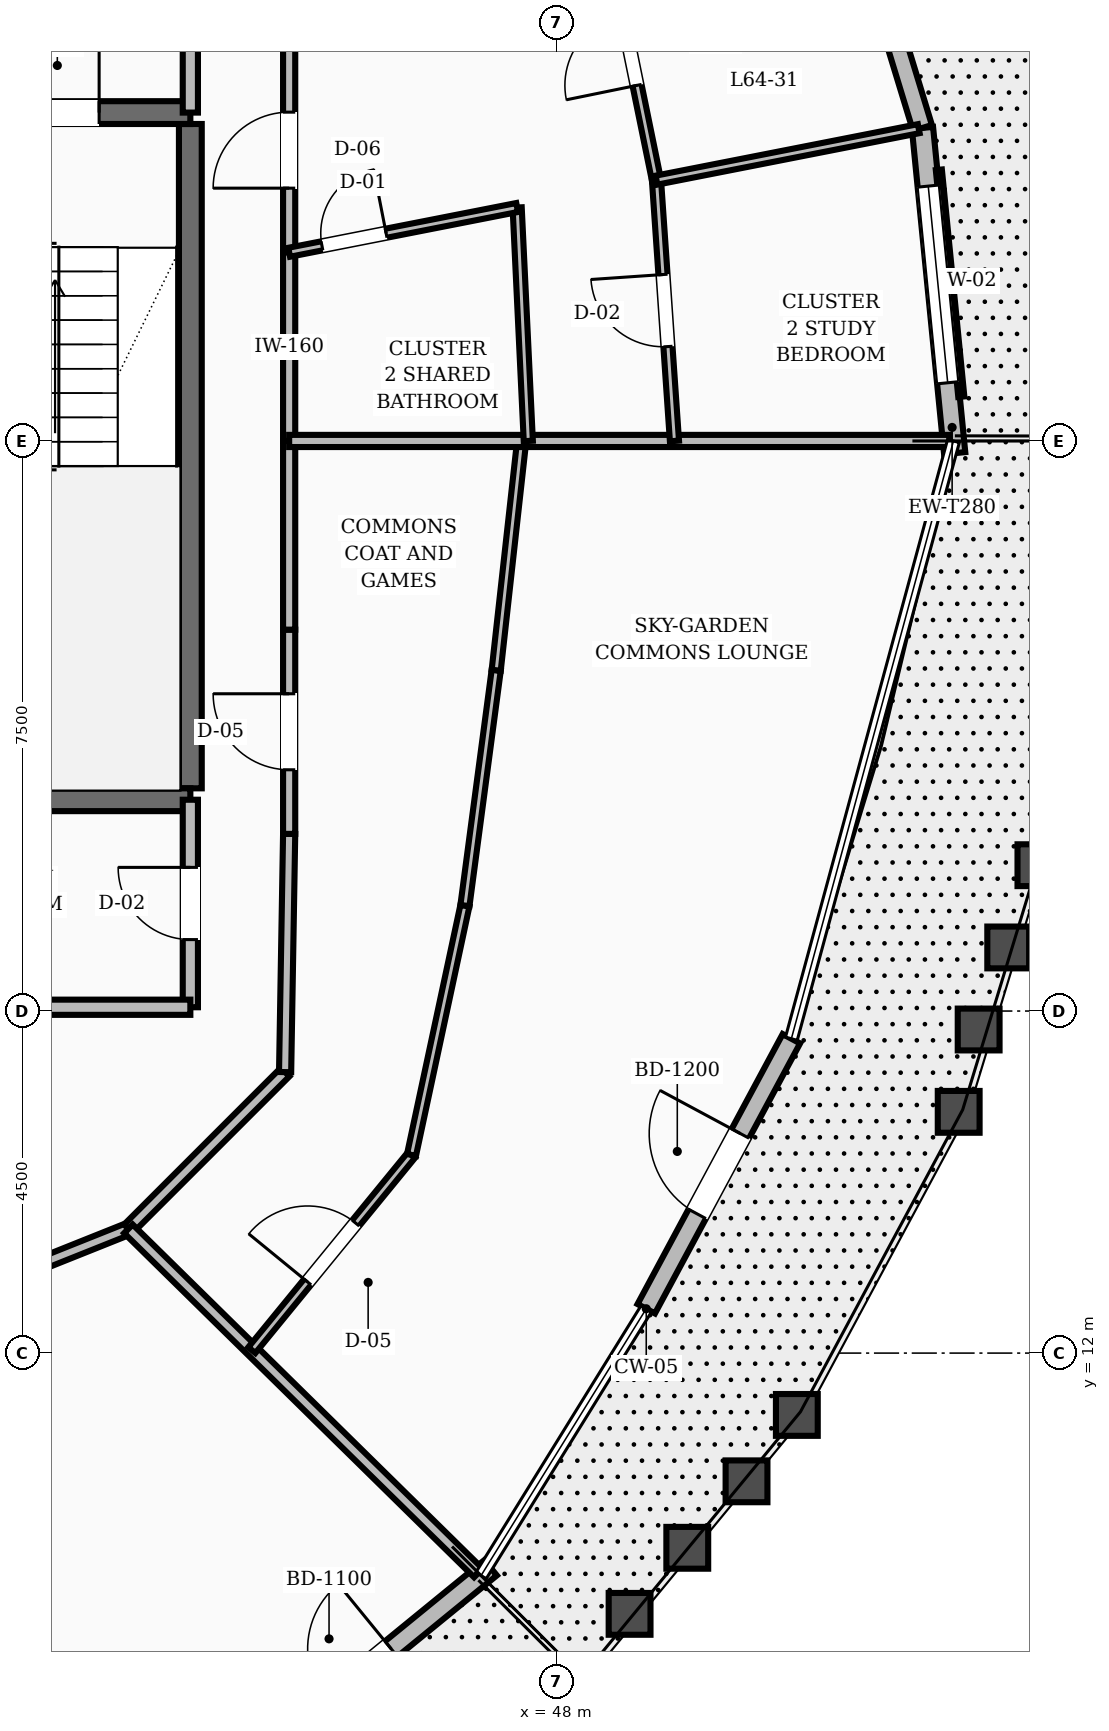
"""IFC4 building model, lengths in metres.
Left out: names, types, materials, properties, quantities, classifications, styles, units other than length and angle.
Written with IfcOpenShell. Run it as: python <this file> out.ifc"""

import sys

from ifc_helpers import new_model, si_unit, direction, frame, frame_2d, origin, place, context, subcontext, project, spatial, rectangle, extrude, element, fill, save


model = new_model("IFC4")
c1 = context("Model", 3, precision=1e-05, world=origin(), true_north=direction((0.0, 1.0)))
c2 = subcontext(c1, "Body", "Model", "MODEL_VIEW")
j1 = project(units=[si_unit("LENGTHUNIT", "METRE"), si_unit("PLANEANGLEUNIT", "RADIAN")], contexts=[c1])
p1 = place(None, origin())
s1 = spatial("IfcSite", under=j1, at=p1, CompositionType="ELEMENT")
p2 = place(p1, origin())
s2 = spatial("IfcBuilding", under=s1, at=p2, CompositionType="ELEMENT")
p3 = place(p2, frame((0.0, 0.0, 247.2)))
s3 = spatial("IfcBuildingStorey", under=s2, at=p3, CompositionType="ELEMENT", Elevation=247.2)
p4 = place(p3, frame((43.18, 19.43, 0.0), z_axis=(0.0, 0.0, 1.0), x_axis=(0.0, 1.0, 0.0)))
e1 = element("IfcWall", 1, at=p4, inside=s3, PredefinedType="SHEAR", context=c2, shape_type="SweptSolid", body=[
    extrude(rectangle(XDim=8.74, YDim=0.3, at=frame_2d((4.37, 0.0))), origin(), (0.0, 0.0, 1.0), 3.6),
])
p5 = place(p3, frame((39.58, 19.28, 0.0), z_axis=(0.0, 0.0, 1.0), x_axis=(1.0, 0.0, 0.0)))
e2 = element("IfcWall", 2, at=p5, inside=s3, PredefinedType="SHEAR", context=c2, shape_type="SweptSolid", body=[
    extrude(rectangle(XDim=3.6, YDim=0.3, at=frame_2d((1.8, 0.0))), origin(), (0.0, 0.0, 1.0), 3.6),
])
p6 = place(p3, frame((39.58, 28.32, 0.0), z_axis=(0.0, 0.0, 1.0), x_axis=(1.0, 0.0, 0.0)))
e3 = element("IfcWall", 3, at=p6, inside=s3, PredefinedType="SHEAR", context=c2, shape_type="SweptSolid", body=[
    extrude(rectangle(XDim=3.6, YDim=0.3, at=frame_2d((1.8, 0.0))), origin(), (0.0, 0.0, 1.0), 3.6),
])
p7 = place(p6, frame((1.3, 0.0, 0.0)))
e4 = element("IfcOpeningElement", 4, at=p7, cuts=e3, PredefinedType="OPENING", context=c2, shape_type="SweptSolid", body=[
    extrude(rectangle(XDim=1.1, YDim=2.1, at=frame_2d((0.55, 1.05))), frame((0.0, 0.16, 0.0), z_axis=(0.0, -1.0, 0.0), x_axis=(1.0, 0.0, 0.0)), (0.0, 0.0, 1.0), 0.32),
])
p8 = place(p3, frame((53.236, 23.84, 0.0), z_axis=(0.0, 0.0, 1.0), x_axis=(-0.098514226855, 0.995135642567, 0.0)))
e5 = element("IfcWall", 5, at=p8, inside=s3, PredefinedType="STANDARD", context=c2, shape_type="SweptSolid", body=[
    extrude(rectangle(XDim=4.3, YDim=0.28, at=frame_2d((2.15, 0.0))), origin(), (0.0, 0.0, 1.0), 2.88),
])
p9 = place(p8, frame((0.93, 0.0, 0.8)))
e6 = element("IfcOpeningElement", 6, at=p9, cuts=e5, PredefinedType="OPENING", context=c2, shape_type="SweptSolid", body=[
    extrude(rectangle(XDim=2.6, YDim=1.65, at=frame_2d((1.3, 0.825))), frame((0.0, 0.15, 0.0), z_axis=(0.0, -1.0, 0.0), x_axis=(1.0, 0.0, 0.0)), (0.0, 0.0, 1.0), 0.3),
])
p10 = place(p3, frame((52.812, 28.118, 0.0), z_axis=(0.0, 0.0, 1.0), x_axis=(-0.291673136786, 0.95651805068, 0.0)))
e7 = element("IfcWall", 7, at=p10, inside=s3, PredefinedType="STANDARD", context=c2, shape_type="SweptSolid", body=[
    extrude(rectangle(XDim=4.14, YDim=0.26, at=frame_2d((2.07, 0.0))), origin(), (0.0, 0.0, 1.0), 2.88),
])
p11 = place(p10, frame((1.52, 0.0, 0.0)))
e8 = element("IfcOpeningElement", 8, at=p11, cuts=e7, PredefinedType="OPENING", context=c2, shape_type="SweptSolid", body=[
    extrude(rectangle(XDim=1.1, YDim=2.15, at=frame_2d((0.55, 1.075))), frame((0.0, 0.14, 0.0), z_axis=(0.0, -1.0, 0.0), x_axis=(1.0, 0.0, 0.0)), (0.0, 0.0, 1.0), 0.28),
])
p12 = place(p3, frame((43.789, 6.448, 0.0), z_axis=(0.0, 0.0, 1.0), x_axis=(0.774617624574, 0.63242986623, 0.0)))
e9 = element("IfcWall", 9, at=p12, inside=s3, PredefinedType="STANDARD", context=c2, shape_type="SweptSolid", body=[
    extrude(rectangle(XDim=4.313, YDim=0.26, at=frame_2d((2.157, 0.0))), origin(), (0.0, 0.0, 1.0), 2.88),
])
p13 = place(p12, frame((1.526, 0.0, 0.0)))
e10 = element("IfcOpeningElement", 10, at=p13, cuts=e9, PredefinedType="OPENING", context=c2, shape_type="SweptSolid", body=[
    extrude(rectangle(XDim=1.1, YDim=2.15, at=frame_2d((0.55, 1.075))), frame((0.0, 0.14, 0.0), z_axis=(0.0, -1.0, 0.0), x_axis=(1.0, 0.0, 0.0)), (0.0, 0.0, 1.0), 0.28),
])
p14 = place(p3, frame((49.178, 12.583, 0.0), z_axis=(0.0, 0.0, 1.0), x_axis=(0.473363272394, 0.88086730689, 0.0)))
e11 = element("IfcWall", 11, at=p14, inside=s3, PredefinedType="STANDARD", context=c2, shape_type="SweptSolid", body=[
    extrude(rectangle(XDim=4.033, YDim=0.26, at=frame_2d((2.017, 0.0))), origin(), (0.0, 0.0, 1.0), 2.88),
])
p15 = place(p14, frame((1.417, 0.0, 0.0)))
e12 = element("IfcOpeningElement", 12, at=p15, cuts=e11, PredefinedType="OPENING", context=c2, shape_type="SweptSolid", body=[
    extrude(rectangle(XDim=1.2, YDim=2.15, at=frame_2d((0.6, 1.075))), frame((0.0, 0.14, 0.0), z_axis=(0.0, -1.0, 0.0), x_axis=(1.0, 0.0, 0.0)), (0.0, 0.0, 1.0), 0.28),
])
p16 = place(p3, frame((43.18, 28.32, 0.0), z_axis=(0.0, 0.0, 1.0), x_axis=(0.0, 1.0, 0.0)))
e13 = element("IfcWall", 13, at=p16, inside=s3, PredefinedType="SOLIDWALL", context=c2, shape_type="SweptSolid", body=[
    extrude(rectangle(XDim=3.13, YDim=0.2, at=frame_2d((1.565, 0.0))), origin(), (0.0, 0.0, 1.0), 2.87),
])
p17 = place(p16, frame((1.015, 0.0, 0.0)))
e14 = element("IfcOpeningElement", 14, at=p17, cuts=e13, PredefinedType="OPENING", context=c2, shape_type="SweptSolid", body=[
    extrude(rectangle(XDim=1.1, YDim=2.1, at=frame_2d((0.55, 1.05))), frame((0.0, 0.11, 0.0), z_axis=(0.0, -1.0, 0.0), x_axis=(1.0, 0.0, 0.0)), (0.0, 0.0, 1.0), 0.22),
])
p18 = place(p3, frame((43.18, 16.55, 0.0), z_axis=(0.0, 0.0, 1.0), x_axis=(0.0, 1.0, 0.0)))
e15 = element("IfcWall", 15, at=p18, inside=s3, PredefinedType="SOLIDWALL", context=c2, shape_type="SweptSolid", body=[
    extrude(rectangle(XDim=2.73, YDim=0.2, at=frame_2d((1.365, 0.0))), origin(), (0.0, 0.0, 1.0), 2.87),
])
p19 = place(p18, frame((0.89, 0.0, 0.0)))
e16 = element("IfcOpeningElement", 16, at=p19, cuts=e15, PredefinedType="OPENING", context=c2, shape_type="SweptSolid", body=[
    extrude(rectangle(XDim=0.95, YDim=2.1, at=frame_2d((0.475, 1.05))), frame((0.0, 0.11, 0.0), z_axis=(0.0, -1.0, 0.0), x_axis=(1.0, 0.0, 0.0)), (0.0, 0.0, 1.0), 0.22),
])
p20 = place(p3, frame((39.2, 16.55, 0.0), z_axis=(0.0, 0.0, 1.0), x_axis=(1.0, 0.0, 0.0)))
e17 = element("IfcWall", 17, at=p20, inside=s3, PredefinedType="SOLIDWALL", context=c2, shape_type="SweptSolid", body=[
    extrude(rectangle(XDim=3.98, YDim=0.2, at=frame_2d((1.99, 0.0))), origin(), (0.0, 0.0, 1.0), 2.87),
])
p21 = place(p3, frame((44.48, 24.0, 0.0), z_axis=(0.0, 0.0, 1.0), x_axis=(0.0, 1.0, 0.0)))
e18 = element("IfcWall", 18, at=p21, inside=s3, PredefinedType="SOLIDWALL", context=c2, shape_type="SweptSolid", body=[
    extrude(rectangle(XDim=2.482, YDim=0.16, at=frame_2d((1.241, 0.0))), origin(), (0.0, 0.0, 1.0), 2.87),
])
p22 = place(p3, frame((44.48, 26.482, 0.0), z_axis=(0.0, 0.0, 1.0), x_axis=(0.0, 1.0, 0.0)))
e19 = element("IfcWall", 19, at=p22, inside=s3, PredefinedType="SOLIDWALL", context=c2, shape_type="SweptSolid", body=[
    extrude(rectangle(XDim=2.687, YDim=0.16, at=frame_2d((1.344, 0.0))), origin(), (0.0, 0.0, 1.0), 2.87),
])
p23 = place(p22, frame((0.844, 0.0, 0.0)))
e20 = element("IfcOpeningElement", 20, at=p23, cuts=e19, PredefinedType="OPENING", context=c2, shape_type="SweptSolid", body=[
    extrude(rectangle(XDim=1.0, YDim=2.1, at=frame_2d((0.5, 1.05))), frame((0.0, 0.09, 0.0), z_axis=(0.0, -1.0, 0.0), x_axis=(1.0, 0.0, 0.0)), (0.0, 0.0, 1.0), 0.18),
])
p24 = place(p3, frame((39.651, 12.55, 0.0), z_axis=(0.0, 0.0, 1.0), x_axis=(0.92856882165, 0.371160266542, 0.0)))
e21 = element("IfcWall", 21, at=p24, inside=s3, PredefinedType="SOLIDWALL", context=c2, shape_type="SweptSolid", body=[
    extrude(rectangle(XDim=2.923, YDim=0.16, at=frame_2d((1.461, 0.0))), origin(), (0.0, 0.0, 1.0), 2.87),
])
p25 = place(p3, frame((42.365, 13.635, 0.0), z_axis=(0.0, 0.0, 1.0), x_axis=(0.707106781187, 0.707106781187, 0.0)))
e22 = element("IfcWall", 22, at=p25, inside=s3, PredefinedType="SOLIDWALL", context=c2, shape_type="SweptSolid", body=[
    extrude(rectangle(XDim=2.916, YDim=0.16, at=frame_2d((1.458, 0.0))), origin(), (0.0, 0.0, 1.0), 2.87),
])
p26 = place(p3, frame((44.427, 15.697, 0.0), z_axis=(0.0, 0.0, 1.0), x_axis=(0.016981035134, 0.999855811828, 0.0)))
e23 = element("IfcWall", 23, at=p26, inside=s3, PredefinedType="SOLIDWALL", context=c2, shape_type="SweptSolid", body=[
    extrude(rectangle(XDim=3.134, YDim=0.16, at=frame_2d((1.567, 0.0))), origin(), (0.0, 0.0, 1.0), 2.87),
])
p27 = place(p3, frame((44.48, 18.831, 0.0), z_axis=(0.0, 0.0, 1.0), x_axis=(0.0, 1.0, 0.0)))
e24 = element("IfcWall", 24, at=p27, inside=s3, PredefinedType="SOLIDWALL", context=c2, shape_type="SweptSolid", body=[
    extrude(rectangle(XDim=2.687, YDim=0.16, at=frame_2d((1.344, 0.0))), origin(), (0.0, 0.0, 1.0), 2.87),
])
p28 = place(p27, frame((0.844, 0.0, 0.0)))
e25 = element("IfcOpeningElement", 25, at=p28, cuts=e24, PredefinedType="OPENING", context=c2, shape_type="SweptSolid", body=[
    extrude(rectangle(XDim=1.0, YDim=2.1, at=frame_2d((0.5, 1.05))), frame((0.0, 0.09, 0.0), z_axis=(0.0, -1.0, 0.0), x_axis=(1.0, 0.0, 0.0)), (0.0, 0.0, 1.0), 0.18),
])
p29 = place(p3, frame((44.48, 21.518, 0.0), z_axis=(0.0, 0.0, 1.0), x_axis=(0.0, 1.0, 0.0)))
e26 = element("IfcWall", 26, at=p29, inside=s3, PredefinedType="SOLIDWALL", context=c2, shape_type="SweptSolid", body=[
    extrude(rectangle(XDim=2.482, YDim=0.16, at=frame_2d((1.241, 0.0))), origin(), (0.0, 0.0, 1.0), 2.87),
])
p30 = place(p3, frame((42.365, 13.635, 0.0), z_axis=(0.0, 0.0, 1.0), x_axis=(0.713074718059, -0.701088044731, 0.0)))
e27 = element("IfcWall", 27, at=p30, inside=s3, PredefinedType="SOLIDWALL", context=c2, shape_type="SweptSolid", body=[
    extrude(rectangle(XDim=6.457, YDim=0.16, at=frame_2d((3.228, 0.0))), origin(), (0.0, 0.0, 1.0), 2.87),
])
p31 = place(p3, frame((43.989, 12.038, 0.0), z_axis=(0.0, 0.0, 1.0), x_axis=(0.633057472725, 0.774104796669, 0.0)))
e28 = element("IfcWall", 28, at=p31, inside=s3, PredefinedType="PARTITIONING", context=c2, shape_type="SweptSolid", body=[
    extrude(rectangle(XDim=3.318, YDim=0.12, at=frame_2d((1.659, 0.0))), origin(), (0.0, 0.0, 1.0), 2.87),
])
p32 = place(p31, frame((1.159, 0.0, 0.0)))
e29 = element("IfcOpeningElement", 29, at=p32, cuts=e28, PredefinedType="OPENING", context=c2, shape_type="SweptSolid", body=[
    extrude(rectangle(XDim=1.0, YDim=2.1, at=frame_2d((0.5, 1.05))), frame((0.0, 0.07, 0.0), z_axis=(0.0, -1.0, 0.0), x_axis=(1.0, 0.0, 0.0)), (0.0, 0.0, 1.0), 0.14),
])
p33 = place(p3, frame((46.09, 14.607, 0.0), z_axis=(0.0, 0.0, 1.0), x_axis=(0.20950424044, 0.977807738381, 0.0)))
e30 = element("IfcWall", 30, at=p33, inside=s3, PredefinedType="PARTITIONING", context=c2, shape_type="SweptSolid", body=[
    extrude(rectangle(XDim=3.355, YDim=0.12, at=frame_2d((1.677, 0.0))), origin(), (0.0, 0.0, 1.0), 2.87),
])
p34 = place(p3, frame((46.792, 17.887, 0.0), z_axis=(0.0, 0.0, 1.0), x_axis=(0.131795047745, 0.991276987219, 0.0)))
e31 = element("IfcWall", 31, at=p34, inside=s3, PredefinedType="PARTITIONING", context=c2, shape_type="SweptSolid", body=[
    extrude(rectangle(XDim=3.123, YDim=0.12, at=frame_2d((1.562, 0.0))), origin(), (0.0, 0.0, 1.0), 2.87),
])
p35 = place(p3, frame((47.204, 20.983, 0.0), z_axis=(0.0, 0.0, 1.0), x_axis=(0.110281438, 0.993900399654, 0.0)))
e32 = element("IfcWall", 32, at=p35, inside=s3, PredefinedType="PARTITIONING", context=c2, shape_type="SweptSolid", body=[
    extrude(rectangle(XDim=3.035, YDim=0.12, at=frame_2d((1.518, 0.0))), origin(), (0.0, 0.0, 1.0), 2.87),
])
p36 = place(p3, frame((44.48, 24.0, 0.0), z_axis=(0.0, 0.0, 1.0), x_axis=(1.0, 0.0, 0.0)))
e33 = element("IfcWall", 33, at=p36, inside=s3, PredefinedType="SOLIDWALL", context=c2, shape_type="SweptSolid", body=[
    extrude(rectangle(XDim=8.69, YDim=0.16, at=frame_2d((4.345, 0.0))), origin(), (0.0, 0.0, 1.0), 2.87),
])
p37 = place(p3, frame((47.626, 24.0, 0.0), z_axis=(0.0, 0.0, 1.0), x_axis=(-0.047719818528, 0.998860760527, 0.0)))
e34 = element("IfcWall", 34, at=p37, inside=s3, PredefinedType="PARTITIONING", context=c2, shape_type="SweptSolid", body=[
    extrude(rectangle(XDim=3.075, YDim=0.12, at=frame_2d((1.537, 0.0))), origin(), (0.0, 0.0, 1.0), 2.87),
])
p38 = place(p3, frame((44.48, 26.482, 0.0), z_axis=(0.0, 0.0, 1.0), x_axis=(0.981268776343, 0.192643682935, 0.0)))
e35 = element("IfcWall", 35, at=p38, inside=s3, PredefinedType="PARTITIONING", context=c2, shape_type="SweptSolid", body=[
    extrude(rectangle(XDim=3.057, YDim=0.12, at=frame_2d((1.528, 0.0))), origin(), (0.0, 0.0, 1.0), 2.87),
])
p39 = place(p38, frame((0.44, 0.0, 0.0)))
e36 = element("IfcOpeningElement", 36, at=p39, cuts=e35, PredefinedType="OPENING", context=c2, shape_type="SweptSolid", body=[
    extrude(rectangle(XDim=0.86, YDim=2.1, at=frame_2d((0.43, 1.05))), frame((0.0, 0.07, 0.0), z_axis=(0.0, -1.0, 0.0), x_axis=(1.0, 0.0, 0.0)), (0.0, 0.0, 1.0), 0.14),
])
p40 = place(p3, frame((49.549, 24.0, 0.0), z_axis=(0.0, 0.0, 1.0), x_axis=(-0.068785038262, 0.99763150437, 0.0)))
e37 = element("IfcWall", 37, at=p40, inside=s3, PredefinedType="PARTITIONING", context=c2, shape_type="SweptSolid", body=[
    extrude(rectangle(XDim=3.439, YDim=0.12, at=frame_2d((1.72, 0.0))), origin(), (0.0, 0.0, 1.0), 2.87),
])
p41 = place(p40, frame((1.245, 0.0, 0.0)))
e38 = element("IfcOpeningElement", 38, at=p41, cuts=e37, PredefinedType="OPENING", context=c2, shape_type="SweptSolid", body=[
    extrude(rectangle(XDim=0.95, YDim=2.1, at=frame_2d((0.475, 1.05))), frame((0.0, 0.07, 0.0), z_axis=(0.0, -1.0, 0.0), x_axis=(1.0, 0.0, 0.0)), (0.0, 0.0, 1.0), 0.14),
])
p42 = place(p3, frame((49.312, 27.431, 0.0), z_axis=(0.0, 0.0, 1.0), x_axis=(-0.20026371196, 0.979742030165, 0.0)))
e39 = element("IfcWall", 39, at=p42, inside=s3, PredefinedType="PARTITIONING", context=c2, shape_type="SweptSolid", body=[
    extrude(rectangle(XDim=3.496, YDim=0.12, at=frame_2d((1.748, 0.0))), origin(), (0.0, 0.0, 1.0), 2.87),
])
p43 = place(p42, frame((1.273, 0.0, 0.0)))
e40 = element("IfcOpeningElement", 40, at=p43, cuts=e39, PredefinedType="OPENING", context=c2, shape_type="SweptSolid", body=[
    extrude(rectangle(XDim=0.95, YDim=2.1, at=frame_2d((0.475, 1.05))), frame((0.0, 0.07, 0.0), z_axis=(0.0, -1.0, 0.0), x_axis=(1.0, 0.0, 0.0)), (0.0, 0.0, 1.0), 0.14),
])
p44 = place(p3, frame((49.312, 27.431, 0.0), z_axis=(0.0, 0.0, 1.0), x_axis=(0.981263590574, 0.192670095793, 0.0)))
e41 = element("IfcWall", 41, at=p44, inside=s3, PredefinedType="PARTITIONING", context=c2, shape_type="SweptSolid", body=[
    extrude(rectangle(XDim=3.516, YDim=0.12, at=frame_2d((1.758, 0.0))), origin(), (0.0, 0.0, 1.0), 2.87),
])
p45 = place(p9, origin())
e42 = element("IfcWindow", 42, at=p45, inside=s3, PartitioningType="SINGLE_PANEL", PredefinedType="WINDOW", context=c2, shape_type="SweptSolid", body=[
    extrude(rectangle(XDim=2.6, YDim=1.65, at=frame_2d((1.3, 0.825))), frame((0.0, 0.03, 0.0), z_axis=(0.0, -1.0, 0.0), x_axis=(1.0, 0.0, 0.0)), (0.0, 0.0, 1.0), 0.06),
])
fill(e6, e42)
p46 = place(p13, origin())
e43 = element("IfcDoor", 43, at=p46, inside=s3, OperationType="SINGLE_SWING_RIGHT", PredefinedType="DOOR", context=c2, shape_type="SweptSolid", body=[
    extrude(rectangle(XDim=1.1, YDim=2.15, at=frame_2d((0.55, 1.075))), frame((0.0, 0.025, 0.0), z_axis=(0.0, -1.0, 0.0), x_axis=(1.0, 0.0, 0.0)), (0.0, 0.0, 1.0), 0.05),
])
fill(e10, e43)
p47 = place(p15, origin())
e44 = element("IfcDoor", 44, at=p47, inside=s3, OperationType="SINGLE_SWING_RIGHT", PredefinedType="DOOR", context=c2, shape_type="SweptSolid", body=[
    extrude(rectangle(XDim=1.2, YDim=2.15, at=frame_2d((0.6, 1.075))), frame((0.0, 0.025, 0.0), z_axis=(0.0, -1.0, 0.0), x_axis=(1.0, 0.0, 0.0)), (0.0, 0.0, 1.0), 0.05),
])
fill(e12, e44)
p48 = place(p7, origin())
e45 = element("IfcDoor", 45, at=p48, inside=s3, OperationType="SINGLE_SWING_RIGHT", PredefinedType="DOOR", context=c2, shape_type="SweptSolid", body=[
    extrude(rectangle(XDim=1.1, YDim=2.1, at=frame_2d((0.55, 1.05))), frame((0.0, 0.025, 0.0), z_axis=(0.0, -1.0, 0.0), x_axis=(1.0, 0.0, 0.0)), (0.0, 0.0, 1.0), 0.05),
])
fill(e4, e45)
p49 = place(p19, origin())
e46 = element("IfcDoor", 46, at=p49, inside=s3, OperationType="SINGLE_SWING_RIGHT", PredefinedType="DOOR", context=c2, shape_type="SweptSolid", body=[
    extrude(rectangle(XDim=0.95, YDim=2.1, at=frame_2d((0.475, 1.05))), frame((0.0, 0.025, 0.0), z_axis=(0.0, -1.0, 0.0), x_axis=(1.0, 0.0, 0.0)), (0.0, 0.0, 1.0), 0.05),
])
fill(e16, e46)
p50 = place(p28, origin())
e47 = element("IfcDoor", 47, at=p50, inside=s3, OperationType="SINGLE_SWING_RIGHT", PredefinedType="DOOR", context=c2, shape_type="SweptSolid", body=[
    extrude(rectangle(XDim=1.0, YDim=2.1, at=frame_2d((0.5, 1.05))), frame((0.0, 0.025, 0.0), z_axis=(0.0, -1.0, 0.0), x_axis=(1.0, 0.0, 0.0)), (0.0, 0.0, 1.0), 0.05),
])
fill(e25, e47)
p51 = place(p32, origin())
e48 = element("IfcDoor", 48, at=p51, inside=s3, OperationType="SINGLE_SWING_LEFT", PredefinedType="DOOR", context=c2, shape_type="SweptSolid", body=[
    extrude(rectangle(XDim=1.0, YDim=2.1, at=frame_2d((0.5, 1.05))), frame((0.0, 0.025, 0.0), z_axis=(0.0, -1.0, 0.0), x_axis=(1.0, 0.0, 0.0)), (0.0, 0.0, 1.0), 0.05),
])
fill(e29, e48)
p52 = place(p39, origin())
e49 = element("IfcDoor", 49, at=p52, inside=s3, OperationType="SINGLE_SWING_RIGHT", PredefinedType="DOOR", context=c2, shape_type="SweptSolid", body=[
    extrude(rectangle(XDim=0.86, YDim=2.1, at=frame_2d((0.43, 1.05))), frame((0.0, 0.025, 0.0), z_axis=(0.0, -1.0, 0.0), x_axis=(1.0, 0.0, 0.0)), (0.0, 0.0, 1.0), 0.05),
])
fill(e36, e49)
p53 = place(p23, origin())
e50 = element("IfcDoor", 50, at=p53, inside=s3, OperationType="SINGLE_SWING_LEFT", PredefinedType="DOOR", context=c2, shape_type="SweptSolid", body=[
    extrude(rectangle(XDim=1.0, YDim=2.1, at=frame_2d((0.5, 1.05))), frame((0.0, 0.025, 0.0), z_axis=(0.0, -1.0, 0.0), x_axis=(1.0, 0.0, 0.0)), (0.0, 0.0, 1.0), 0.05),
])
fill(e20, e50)
p54 = place(p41, origin())
e51 = element("IfcDoor", 51, at=p54, inside=s3, OperationType="SINGLE_SWING_RIGHT", PredefinedType="DOOR", context=c2, shape_type="SweptSolid", body=[
    extrude(rectangle(XDim=0.95, YDim=2.1, at=frame_2d((0.475, 1.05))), frame((0.0, 0.025, 0.0), z_axis=(0.0, -1.0, 0.0), x_axis=(1.0, 0.0, 0.0)), (0.0, 0.0, 1.0), 0.05),
])
fill(e38, e51)
p55 = place(p43, origin())
e52 = element("IfcDoor", 52, at=p55, inside=s3, OperationType="SINGLE_SWING_LEFT", PredefinedType="DOOR", context=c2, shape_type="SweptSolid", body=[
    extrude(rectangle(XDim=0.95, YDim=2.1, at=frame_2d((0.475, 1.05))), frame((0.0, 0.025, 0.0), z_axis=(0.0, -1.0, 0.0), x_axis=(1.0, 0.0, 0.0)), (0.0, 0.0, 1.0), 0.05),
])
fill(e40, e52)
save(model, sys.argv[1])
